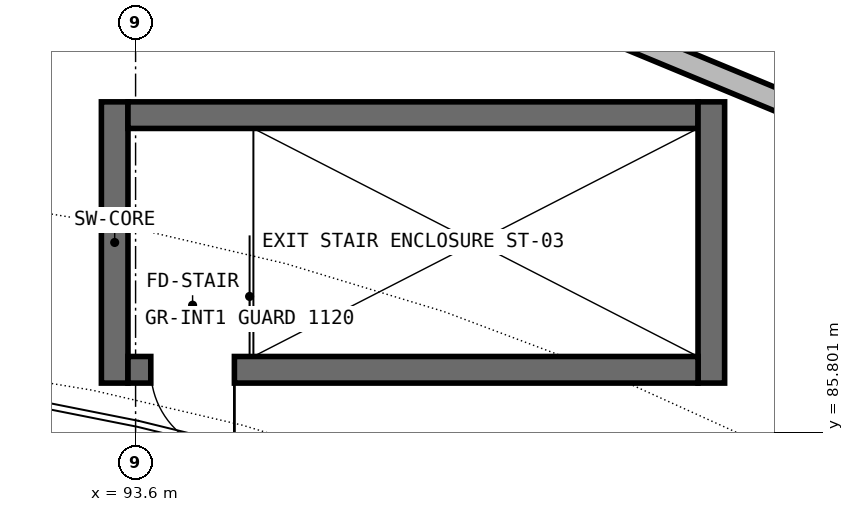
"""IFC4 building model, lengths in metres.
Left out: names, types, materials, properties, quantities, classifications, styles, units other than length and angle.
Written with IfcOpenShell. Run it as: python <this file> out.ifc"""

import sys

from ifc_helpers import new_model, si_unit, direction, frame, frame_2d, origin, place, context, subcontext, project, spatial, rectangle, extrude, element, fill, save


model = new_model("IFC4")
c1 = context("Model", 3, precision=1e-05, world=origin(), true_north=direction((0.0, 1.0)))
c2 = subcontext(c1, "Body", "Model", "MODEL_VIEW")
j1 = project(units=[si_unit("LENGTHUNIT", "METRE"), si_unit("PLANEANGLEUNIT", "RADIAN")], contexts=[c1])
p1 = place(None, origin())
s1 = spatial("IfcSite", under=j1, at=p1, CompositionType="ELEMENT")
p2 = place(p1, origin())
s2 = spatial("IfcBuilding", under=s1, at=p2, CompositionType="ELEMENT")
p3 = place(p2, frame((0.0, 0.0, 14.35)))
s3 = spatial("IfcBuildingStorey", under=s2, at=p3, CompositionType="ELEMENT", Elevation=14.35)
p4 = place(p3, frame((93.325, 86.45, 0.0), z_axis=(0.0, 0.0, 1.0), x_axis=(0.0, 1.0, 0.0)))
e1 = element("IfcWall", 1, at=p4, inside=s3, PredefinedType="SHEAR", context=c2, shape_type="SweptSolid", body=[
    extrude(rectangle(XDim=3.7, YDim=0.35, at=frame_2d((1.85, 0.0))), origin(), (0.0, 0.0, 1.0), 4.35),
])
p5 = place(p3, frame((93.5, 89.975, 0.0), z_axis=(0.0, 0.0, 1.0), x_axis=(1.0, 0.0, 0.0)))
e2 = element("IfcWall", 2, at=p5, inside=s3, PredefinedType="SHEAR", context=c2, shape_type="SweptSolid", body=[
    extrude(rectangle(XDim=7.5, YDim=0.35, at=frame_2d((3.75, 0.0))), origin(), (0.0, 0.0, 1.0), 4.35),
])
p6 = place(p3, frame((101.175, 90.15, 0.0), z_axis=(0.0, 0.0, 1.0), x_axis=(0.0, -1.0, 0.0)))
e3 = element("IfcWall", 3, at=p6, inside=s3, PredefinedType="SHEAR", context=c2, shape_type="SweptSolid", body=[
    extrude(rectangle(XDim=3.7, YDim=0.35, at=frame_2d((1.85, 0.0))), origin(), (0.0, 0.0, 1.0), 4.35),
])
p7 = place(p3, frame((101.0, 86.625, 0.0), z_axis=(0.0, 0.0, 1.0), x_axis=(-1.0, 0.0, 0.0)))
e4 = element("IfcWall", 4, at=p7, inside=s3, PredefinedType="SHEAR", context=c2, shape_type="SweptSolid", body=[
    extrude(rectangle(XDim=7.5, YDim=0.35, at=frame_2d((3.75, 0.0))), origin(), (0.0, 0.0, 1.0), 4.35),
])
p8 = place(p7, frame((6.1, 0.0, 0.0)))
e5 = element("IfcOpeningElement", 5, at=p8, cuts=e4, PredefinedType="OPENING", context=c2, shape_type="SweptSolid", body=[
    extrude(rectangle(XDim=1.1, YDim=2.15, at=frame_2d((0.55, 1.075))), frame((0.0, 0.185, 0.0), z_axis=(0.0, -1.0, 0.0), x_axis=(1.0, 0.0, 0.0)), (0.0, 0.0, 1.0), 0.37),
])
p9 = place(p3, frame((106.325, 89.483, 0.0), z_axis=(0.0, 0.0, 1.0), x_axis=(-0.92385889973, 0.382733240508, 0.0)))
e6 = element("IfcWall", 6, at=p9, inside=s3, PredefinedType="SOLIDWALL", context=c2, shape_type="SweptSolid", body=[
    extrude(rectangle(XDim=10.081, YDim=0.29, at=frame_2d((5.04, 0.0))), origin(), (0.0, 0.0, 1.0), 4.37),
])
p10 = place(p9, frame((3.855, 0.0, 0.95)))
e7 = element("IfcOpeningElement", 7, at=p10, cuts=e6, PredefinedType="OPENING", context=c2, shape_type="SweptSolid", body=[
    extrude(rectangle(XDim=2.37, YDim=1.59, at=frame_2d((1.185, 0.795))), frame((0.0, 0.155, 0.0), z_axis=(0.0, -1.0, 0.0), x_axis=(1.0, 0.0, 0.0)), (0.0, 0.0, 1.0), 0.31),
])
p11 = place(p3, frame((96.748, 92.366, 0.0), z_axis=(0.0, 0.0, 1.0), x_axis=(0.923848052238, -0.382759423628, 0.0)))
e8 = element("IfcWall", 8, at=p11, inside=s3, PredefinedType="SOLIDWALL", context=c2, shape_type="SweptSolid", body=[
    extrude(rectangle(XDim=9.821, YDim=0.29, at=frame_2d((4.91, 0.0))), origin(), (0.0, 0.0, 1.0), 4.37),
])
p12 = place(p11, frame((1.6, 0.0, 0.95)))
e9 = element("IfcOpeningElement", 9, at=p12, cuts=e8, PredefinedType="OPENING", context=c2, shape_type="SweptSolid", body=[
    extrude(rectangle(XDim=1.71, YDim=1.8, at=frame_2d((0.855, 0.9))), frame((0.0, 0.155, 0.0), z_axis=(0.0, -1.0, 0.0), x_axis=(1.0, 0.0, 0.0)), (0.0, 0.0, 1.0), 0.31),
])
p13 = place(p11, frame((6.511, 0.0, 0.95)))
e10 = element("IfcOpeningElement", 10, at=p13, cuts=e8, PredefinedType="OPENING", context=c2, shape_type="SweptSolid", body=[
    extrude(rectangle(XDim=1.71, YDim=1.8, at=frame_2d((0.855, 0.9))), frame((0.0, 0.155, 0.0), z_axis=(0.0, -1.0, 0.0), x_axis=(1.0, 0.0, 0.0)), (0.0, 0.0, 1.0), 0.31),
])
p14 = place(p8, origin())
e11 = element("IfcDoor", 11, at=p14, inside=s3, OperationType="SINGLE_SWING_LEFT", PredefinedType="DOOR", context=c2, shape_type="SweptSolid", body=[
    extrude(rectangle(XDim=1.1, YDim=2.15, at=frame_2d((0.55, 1.075))), frame((0.0, 0.025, 0.0), z_axis=(0.0, -1.0, 0.0), x_axis=(1.0, 0.0, 0.0)), (0.0, 0.0, 1.0), 0.05),
])
fill(e5, e11)
save(model, sys.argv[1])
